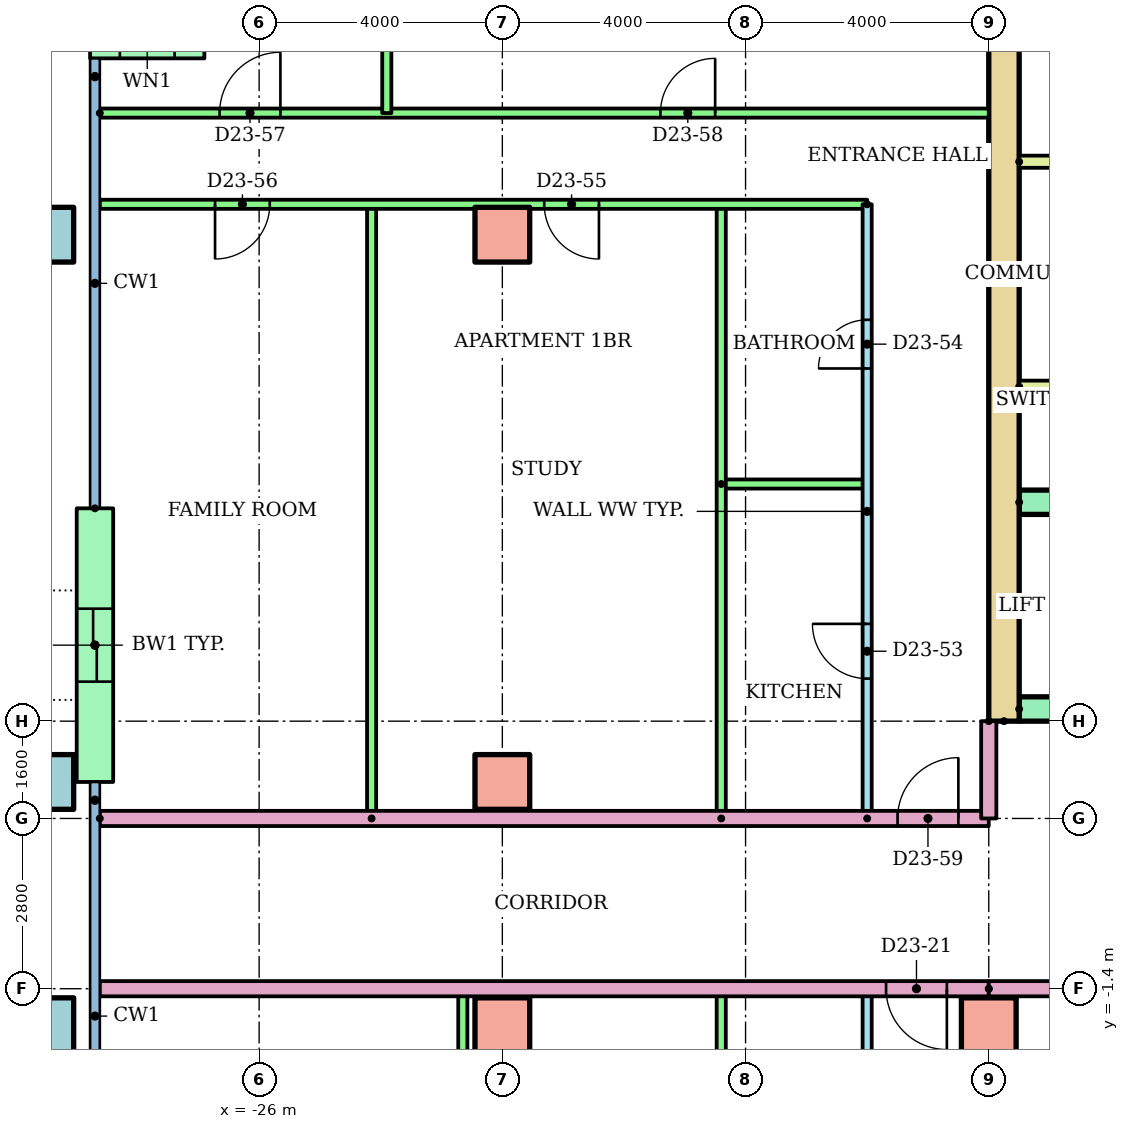
"""IFC4 building model, lengths in metres.
Left out: names, types, materials, properties, quantities, classifications, styles, units other than length and angle.
Written with IfcOpenShell. Run it as: python <this file> out.ifc"""

import sys

from ifc_helpers import new_model, si_unit, direction, frame, frame_2d, origin, origin_2d, place, context, subcontext, project, spatial, rectangle, hollow_rectangle, extrude, element, fill, save


model = new_model("IFC4")
c1 = context("Model", 3, precision=1e-05, world=origin(), true_north=direction((0.0, 1.0)))
c2 = subcontext(c1, "Body", "Model", "MODEL_VIEW")
j1 = project(units=[si_unit("LENGTHUNIT", "METRE"), si_unit("PLANEANGLEUNIT", "RADIAN")], contexts=[c1])
p1 = place(None, origin())
s1 = spatial("IfcSite", under=j1, at=p1, CompositionType="ELEMENT")
p2 = place(p1, origin())
s2 = spatial("IfcBuilding", under=s1, at=p2, CompositionType="ELEMENT")
p3 = place(p2, frame((0.0, 0.0, 90.3)))
s3 = spatial("IfcBuildingStorey", under=s2, at=p3, CompositionType="ELEMENT", Elevation=90.3)
p4 = place(p3, frame((-29.5, -2.0, 0.0)))
e1 = element("IfcColumn", 1, at=p4, inside=s3, PredefinedType="COLUMN", context=c2, shape_type="SweptSolid", body=[
    extrude(hollow_rectangle(XDim=0.9, YDim=0.9, WallThickness=0.045, at=origin_2d()), origin(), (0.0, 0.0, 1.0), 3.2),
])
for number, where in (
    (2, (-22.0, -2.0, 0.0)),
    (3, (-14.0, -2.0, 0.0)),
):
    element("IfcColumn", number, at=place(p3, frame(where)), inside=s3, PredefinedType="COLUMN", context=c2, shape_type="SweptSolid", body=[
        extrude(rectangle(XDim=0.9, YDim=0.9, at=origin_2d()), origin(), (0.0, 0.0, 1.0), 3.2),
    ])
p5 = place(p3, frame((-29.5, 2.0, 0.0)))
e4 = element("IfcColumn", 4, at=p5, inside=s3, PredefinedType="COLUMN", context=c2, shape_type="SweptSolid", body=[
    extrude(hollow_rectangle(XDim=0.9, YDim=0.9, WallThickness=0.045, at=origin_2d()), origin(), (0.0, 0.0, 1.0), 3.2),
])
p6 = place(p3, frame((-22.0, 2.0, 0.0)))
e5 = element("IfcColumn", 5, at=p6, inside=s3, PredefinedType="COLUMN", context=c2, shape_type="SweptSolid", body=[
    extrude(rectangle(XDim=0.9, YDim=0.9, at=origin_2d()), origin(), (0.0, 0.0, 1.0), 3.2),
])
p7 = place(p3, frame((-29.5, 11.0, 0.0)))
e6 = element("IfcColumn", 6, at=p7, inside=s3, PredefinedType="COLUMN", context=c2, shape_type="SweptSolid", body=[
    extrude(hollow_rectangle(XDim=0.9, YDim=0.9, WallThickness=0.045, at=origin_2d()), origin(), (0.0, 0.0, 1.0), 3.2),
])
p8 = place(p3, frame((-22.0, 11.0, 0.0)))
e7 = element("IfcColumn", 7, at=p8, inside=s3, PredefinedType="COLUMN", context=c2, shape_type="SweptSolid", body=[
    extrude(rectangle(XDim=0.9, YDim=0.9, at=origin_2d()), origin(), (0.0, 0.0, 1.0), 3.2),
])
p9 = place(p3, frame((-26.9, 14.2, 0.0), z_axis=(0.0, 0.0, 1.0), x_axis=(-1.0, 0.0, 0.0)))
e8 = element("IfcWall", 8, at=p9, inside=s3, PredefinedType="STANDARD", context=c2, shape_type="SweptSolid", body=[
    extrude(rectangle(XDim=1.88, YDim=0.6, at=frame_2d((0.94, 0.0))), origin(), (0.0, 0.0, 1.0), 2.92),
])
p10 = place(p9, frame((0.49, 0.0, 0.9)))
e9 = element("IfcOpeningElement", 9, at=p10, cuts=e8, PredefinedType="OPENING", context=c2, shape_type="SweptSolid", body=[
    extrude(rectangle(XDim=0.9, YDim=1.5, at=frame_2d((0.45, 0.75))), frame((0.0, 0.31, 0.0), z_axis=(0.0, -1.0, 0.0), x_axis=(1.0, 0.0, 0.0)), (0.0, 0.0, 1.0), 0.62),
])
p11 = place(p3, frame((-28.7, 6.5, 0.0), z_axis=(0.0, 0.0, 1.0), x_axis=(0.0, -1.0, 0.0)))
e10 = element("IfcWall", 10, at=p11, inside=s3, PredefinedType="STANDARD", context=c2, shape_type="SweptSolid", body=[
    extrude(rectangle(XDim=4.5, YDim=0.6, at=frame_2d((2.25, 0.0))), origin(), (0.0, 0.0, 1.0), 2.92),
])
p12 = place(p11, frame((1.65, 0.0, 0.0)))
e11 = element("IfcOpeningElement", 11, at=p12, cuts=e10, PredefinedType="OPENING", context=c2, shape_type="SweptSolid", body=[
    extrude(rectangle(XDim=1.2, YDim=2.1, at=frame_2d((0.6, 1.05))), frame((0.0, 0.31, 0.0), z_axis=(0.0, -1.0, 0.0), x_axis=(1.0, 0.0, 0.0)), (0.0, 0.0, 1.0), 0.62),
])
p13 = place(p3, frame((-13.75, 3.0, 0.0), z_axis=(0.0, 0.0, 1.0), x_axis=(0.0, 1.0, 0.0)))
e12 = element("IfcWall", 12, at=p13, inside=s3, PredefinedType="SHEAR", context=c2, shape_type="SweptSolid", body=[
    extrude(rectangle(XDim=17.0, YDim=0.5, at=frame_2d((8.5, 0.0))), origin(), (0.0, 0.0, 1.0), 2.92),
])
p14 = place(p3, frame((-13.5, 3.2, 0.0)))
e13 = element("IfcWall", 13, at=p14, inside=s3, PredefinedType="SHEAR", context=c2, shape_type="SweptSolid", body=[
    extrude(rectangle(XDim=27.0, YDim=0.4, at=frame_2d((13.5, 0.0))), origin(), (0.0, 0.0, 1.0), 2.92),
])
p15 = place(p14, frame((6.861, 0.0, 0.0)))
e14 = element("IfcOpeningElement", 14, at=p15, cuts=e13, PredefinedType="OPENING", context=c2, shape_type="SweptSolid", body=[
    extrude(rectangle(XDim=1.1, YDim=2.1, at=frame_2d((0.55, 1.05))), frame((0.0, 0.21, 0.0), z_axis=(0.0, -1.0, 0.0), x_axis=(1.0, 0.0, 0.0)), (0.0, 0.0, 1.0), 0.42),
])
p16 = place(p14, frame((9.906, 0.0, 0.0)))
e15 = element("IfcOpeningElement", 15, at=p16, cuts=e13, PredefinedType="OPENING", context=c2, shape_type="SweptSolid", body=[
    extrude(rectangle(XDim=1.1, YDim=2.1, at=frame_2d((0.55, 1.05))), frame((0.0, 0.21, 0.0), z_axis=(0.0, -1.0, 0.0), x_axis=(1.0, 0.0, 0.0)), (0.0, 0.0, 1.0), 0.42),
])
p17 = place(p14, frame((15.994, 0.0, 0.0)))
e16 = element("IfcOpeningElement", 16, at=p17, cuts=e13, PredefinedType="OPENING", context=c2, shape_type="SweptSolid", body=[
    extrude(rectangle(XDim=1.1, YDim=2.1, at=frame_2d((0.55, 1.05))), frame((0.0, 0.21, 0.0), z_axis=(0.0, -1.0, 0.0), x_axis=(1.0, 0.0, 0.0)), (0.0, 0.0, 1.0), 0.42),
])
p18 = place(p14, frame((19.039, 0.0, 0.0)))
e17 = element("IfcOpeningElement", 17, at=p18, cuts=e13, PredefinedType="OPENING", context=c2, shape_type="SweptSolid", body=[
    extrude(rectangle(XDim=1.1, YDim=2.1, at=frame_2d((0.55, 1.05))), frame((0.0, 0.21, 0.0), z_axis=(0.0, -1.0, 0.0), x_axis=(1.0, 0.0, 0.0)), (0.0, 0.0, 1.0), 0.42),
])
p19 = place(p14, frame((12.6, 0.0, 0.0)))
e18 = element("IfcOpeningElement", 18, at=p19, cuts=e13, PredefinedType="OPENING", context=c2, shape_type="SweptSolid", body=[
    extrude(rectangle(XDim=1.8, YDim=2.1, at=frame_2d((0.9, 1.05))), frame((0.0, 0.21, 0.0), z_axis=(0.0, -1.0, 0.0), x_axis=(1.0, 0.0, 0.0)), (0.0, 0.0, 1.0), 0.42),
])
p20 = place(p3, frame((-13.5, 6.6, 0.0)))
e19 = element("IfcWall", 19, at=p20, inside=s3, PredefinedType="SHEAR", context=c2, shape_type="SweptSolid", body=[
    extrude(rectangle(XDim=11.978, YDim=0.4, at=frame_2d((5.989, 0.0))), origin(), (0.0, 0.0, 1.0), 2.92),
])
for number, where in (
    (20, (-13.5, 8.5, 0.0)),
    (21, (-13.5, 12.2, 0.0)),
):
    element("IfcWall", number, at=place(p3, frame(where)), inside=s3, PredefinedType="PARTITIONING", context=c2, shape_type="SweptSolid", body=[
        extrude(rectangle(XDim=3.9, YDim=0.2, at=frame_2d((1.95, 0.0))), origin(), (0.0, 0.0, 1.0), 2.92),
    ])
p21 = place(p3, frame((-16.0, -9.1, 0.0), z_axis=(0.0, 0.0, 1.0), x_axis=(0.0, 1.0, 0.0)))
e22 = element("IfcWall", 22, at=p21, inside=s3, PredefinedType="PARTITIONING", context=c2, shape_type="SweptSolid", body=[
    extrude(rectangle(XDim=7.7, YDim=0.15, at=frame_2d((3.85, 0.0))), origin(), (0.0, 0.0, 1.0), 2.4),
])
p22 = place(p21, frame((5.125, 0.0, 0.0)))
e23 = element("IfcOpeningElement", 23, at=p22, cuts=e22, PredefinedType="OPENING", context=c2, shape_type="SweptSolid", body=[
    extrude(rectangle(XDim=0.9, YDim=2.1, at=frame_2d((0.45, 1.05))), frame((0.0, 0.085, 0.0), z_axis=(0.0, -1.0, 0.0), x_axis=(1.0, 0.0, 0.0)), (0.0, 0.0, 1.0), 0.17),
])
p23 = place(p21, frame((1.325, 0.0, 0.0)))
e24 = element("IfcOpeningElement", 24, at=p23, cuts=e22, PredefinedType="OPENING", context=c2, shape_type="SweptSolid", body=[
    extrude(rectangle(XDim=0.8, YDim=2.1, at=frame_2d((0.4, 1.05))), frame((0.0, 0.085, 0.0), z_axis=(0.0, -1.0, 0.0), x_axis=(1.0, 0.0, 0.0)), (0.0, 0.0, 1.0), 0.17),
])
for number, where, z_axis, x_axis in (
    (25, (-18.4, -9.1, 0.0), (0.0, 0.0, 1.0), (0.0, 1.0, 0.0)),
    (26, (-22.65, -9.1, 0.0), (0.0, 0.0, 1.0), (0.0, 1.0, 0.0)),
):
    element("IfcWall", number, at=place(p3, frame(where, z_axis=z_axis, x_axis=x_axis)), inside=s3, PredefinedType="PARTITIONING", context=c2, shape_type="SweptSolid", body=[
        extrude(rectangle(XDim=7.7, YDim=0.15, at=frame_2d((3.85, 0.0))), origin(), (0.0, 0.0, 1.0), 2.4),
    ])
p24 = place(p3, frame((-14.0, -1.4, 0.0), z_axis=(0.0, 0.0, 1.0), x_axis=(0.0, -1.0, 0.0)))
e27 = element("IfcWall", 27, at=p24, inside=s3, PredefinedType="PARTITIONING", context=c2, shape_type="SweptSolid", body=[
    extrude(rectangle(XDim=14.81, YDim=0.25, at=frame_2d((7.405, 0.0))), origin(), (0.0, 0.0, 1.0), 2.4),
])
p25 = place(p3, frame((-14.0, -1.4, 0.0), z_axis=(0.0, 0.0, 1.0), x_axis=(-1.0, 0.0, 0.0)))
e28 = element("IfcWall", 28, at=p25, inside=s3, PredefinedType="PARTITIONING", context=c2, shape_type="SweptSolid", body=[
    extrude(rectangle(XDim=14.62, YDim=0.25, at=frame_2d((7.31, 0.0))), origin(), (0.0, 0.0, 1.0), 2.4),
])
p26 = place(p25, frame((0.689, 0.0, 0.0)))
e29 = element("IfcOpeningElement", 29, at=p26, cuts=e28, PredefinedType="OPENING", context=c2, shape_type="SweptSolid", body=[
    extrude(rectangle(XDim=1.0, YDim=2.1, at=frame_2d((0.5, 1.05))), frame((0.0, 0.135, 0.0), z_axis=(0.0, -1.0, 0.0), x_axis=(1.0, 0.0, 0.0)), (0.0, 0.0, 1.0), 0.27),
])
p27 = place(p3, frame((-16.0, 1.4, 0.0), z_axis=(0.0, 0.0, 1.0), x_axis=(0.0, 1.0, 0.0)))
e30 = element("IfcWall", 30, at=p27, inside=s3, PredefinedType="PARTITIONING", context=c2, shape_type="SweptSolid", body=[
    extrude(rectangle(XDim=10.1, YDim=0.15, at=frame_2d((5.05, 0.0))), origin(), (0.0, 0.0, 1.0), 2.4),
])
p28 = place(p27, frame((2.3, 0.0, 0.0)))
e31 = element("IfcOpeningElement", 31, at=p28, cuts=e30, PredefinedType="OPENING", context=c2, shape_type="SweptSolid", body=[
    extrude(rectangle(XDim=0.9, YDim=2.1, at=frame_2d((0.45, 1.05))), frame((0.0, 0.085, 0.0), z_axis=(0.0, -1.0, 0.0), x_axis=(1.0, 0.0, 0.0)), (0.0, 0.0, 1.0), 0.17),
])
p29 = place(p27, frame((7.4, 0.0, 0.0)))
e32 = element("IfcOpeningElement", 32, at=p29, cuts=e30, PredefinedType="OPENING", context=c2, shape_type="SweptSolid", body=[
    extrude(rectangle(XDim=0.8, YDim=2.1, at=frame_2d((0.4, 1.05))), frame((0.0, 0.085, 0.0), z_axis=(0.0, -1.0, 0.0), x_axis=(1.0, 0.0, 0.0)), (0.0, 0.0, 1.0), 0.17),
])
p30 = place(p3, frame((-18.4, 6.9, 0.0)))
e33 = element("IfcWall", 33, at=p30, inside=s3, PredefinedType="PARTITIONING", context=c2, shape_type="SweptSolid", body=[
    extrude(rectangle(XDim=2.4, YDim=0.15, at=frame_2d((1.2, 0.0))), origin(), (0.0, 0.0, 1.0), 2.4),
])
for number, where, z_axis, x_axis in (
    (34, (-18.4, 1.4, 0.0), (0.0, 0.0, 1.0), (0.0, 1.0, 0.0)),
    (35, (-24.15, 1.4, 0.0), (0.0, 0.0, 1.0), (0.0, 1.0, 0.0)),
):
    element("IfcWall", number, at=place(p3, frame(where, z_axis=z_axis, x_axis=x_axis)), inside=s3, PredefinedType="PARTITIONING", context=c2, shape_type="SweptSolid", body=[
        extrude(rectangle(XDim=10.1, YDim=0.15, at=frame_2d((5.05, 0.0))), origin(), (0.0, 0.0, 1.0), 2.4),
    ])
p31 = place(p3, frame((-16.0, 11.5, 0.0), z_axis=(0.0, 0.0, 1.0), x_axis=(-1.0, 0.0, 0.0)))
e36 = element("IfcWall", 36, at=p31, inside=s3, PredefinedType="PARTITIONING", context=c2, shape_type="SweptSolid", body=[
    extrude(rectangle(XDim=12.62, YDim=0.15, at=frame_2d((6.31, 0.0))), origin(), (0.0, 0.0, 1.0), 2.4),
])
p32 = place(p31, frame((4.411, 0.0, 0.0)))
e37 = element("IfcOpeningElement", 37, at=p32, cuts=e36, PredefinedType="OPENING", context=c2, shape_type="SweptSolid", body=[
    extrude(rectangle(XDim=0.9, YDim=2.1, at=frame_2d((0.45, 1.05))), frame((0.0, 0.085, 0.0), z_axis=(0.0, -1.0, 0.0), x_axis=(1.0, 0.0, 0.0)), (0.0, 0.0, 1.0), 0.17),
])
p33 = place(p31, frame((9.825, 0.0, 0.0)))
e38 = element("IfcOpeningElement", 38, at=p33, cuts=e36, PredefinedType="OPENING", context=c2, shape_type="SweptSolid", body=[
    extrude(rectangle(XDim=0.9, YDim=2.1, at=frame_2d((0.45, 1.05))), frame((0.0, 0.085, 0.0), z_axis=(0.0, -1.0, 0.0), x_axis=(1.0, 0.0, 0.0)), (0.0, 0.0, 1.0), 0.17),
])
p34 = place(p3, frame((-28.62, 13.0, 0.0)))
e39 = element("IfcWall", 39, at=p34, inside=s3, PredefinedType="PARTITIONING", context=c2, shape_type="SweptSolid", body=[
    extrude(rectangle(XDim=14.62, YDim=0.15, at=frame_2d((7.31, 0.0))), origin(), (0.0, 0.0, 1.0), 2.4),
])
p35 = place(p34, frame((1.97, 0.0, 0.0)))
e40 = element("IfcOpeningElement", 40, at=p35, cuts=e39, PredefinedType="OPENING", context=c2, shape_type="SweptSolid", body=[
    extrude(rectangle(XDim=1.0, YDim=2.1, at=frame_2d((0.5, 1.05))), frame((0.0, 0.085, 0.0), z_axis=(0.0, -1.0, 0.0), x_axis=(1.0, 0.0, 0.0)), (0.0, 0.0, 1.0), 0.17),
])
p36 = place(p34, frame((9.22, 0.0, 0.0)))
e41 = element("IfcOpeningElement", 41, at=p36, cuts=e39, PredefinedType="OPENING", context=c2, shape_type="SweptSolid", body=[
    extrude(rectangle(XDim=0.9, YDim=2.1, at=frame_2d((0.45, 1.05))), frame((0.0, 0.085, 0.0), z_axis=(0.0, -1.0, 0.0), x_axis=(1.0, 0.0, 0.0)), (0.0, 0.0, 1.0), 0.17),
])
p37 = place(p3, frame((-23.9, 16.82, 0.0), z_axis=(0.0, 0.0, 1.0), x_axis=(0.0, -1.0, 0.0)))
e42 = element("IfcWall", 42, at=p37, inside=s3, PredefinedType="PARTITIONING", context=c2, shape_type="SweptSolid", body=[
    extrude(rectangle(XDim=3.82, YDim=0.15, at=frame_2d((1.91, 0.0))), origin(), (0.0, 0.0, 1.0), 2.4),
])
p38 = place(p3, frame((-28.62, 1.4, 0.0)))
e43 = element("IfcWall", 43, at=p38, inside=s3, PredefinedType="PARTITIONING", context=c2, shape_type="SweptSolid", body=[
    extrude(rectangle(XDim=14.62, YDim=0.25, at=frame_2d((7.31, 0.0))), origin(), (0.0, 0.0, 1.0), 2.4),
])
p39 = place(p38, frame((13.12, 0.0, 0.0)))
e44 = element("IfcOpeningElement", 44, at=p39, cuts=e43, PredefinedType="OPENING", context=c2, shape_type="SweptSolid", body=[
    extrude(rectangle(XDim=1.0, YDim=2.1, at=frame_2d((0.5, 1.05))), frame((0.0, 0.135, 0.0), z_axis=(0.0, -1.0, 0.0), x_axis=(1.0, 0.0, 0.0)), (0.0, 0.0, 1.0), 0.27),
])
p40 = place(p3, frame((14.0, -1.4, 0.0), z_axis=(0.0, 0.0, 1.0), x_axis=(-1.0, 0.0, 0.0)))
e45 = element("IfcWall", 45, at=p40, inside=s3, PredefinedType="PARTITIONING", context=c2, shape_type="SweptSolid", body=[
    extrude(rectangle(XDim=28.0, YDim=0.25, at=frame_2d((14.0, 0.0))), origin(), (0.0, 0.0, 1.0), 2.4),
])
p41 = place(p40, frame((12.689, 0.0, 0.0)))
e46 = element("IfcOpeningElement", 46, at=p41, cuts=e45, PredefinedType="OPENING", context=c2, shape_type="SweptSolid", body=[
    extrude(rectangle(XDim=1.0, YDim=2.1, at=frame_2d((0.5, 1.05))), frame((0.0, 0.135, 0.0), z_axis=(0.0, -1.0, 0.0), x_axis=(1.0, 0.0, 0.0)), (0.0, 0.0, 1.0), 0.27),
])
p42 = place(p40, frame((10.311, 0.0, 0.0)))
e47 = element("IfcOpeningElement", 47, at=p42, cuts=e45, PredefinedType="OPENING", context=c2, shape_type="SweptSolid", body=[
    extrude(rectangle(XDim=1.0, YDim=2.1, at=frame_2d((0.5, 1.05))), frame((0.0, 0.135, 0.0), z_axis=(0.0, -1.0, 0.0), x_axis=(1.0, 0.0, 0.0)), (0.0, 0.0, 1.0), 0.27),
])
p43 = place(p3, frame((-14.0, 3.0, 0.0), z_axis=(0.0, 0.0, 1.0), x_axis=(0.0, -1.0, 0.0)))
e48 = element("IfcWall", 48, at=p43, inside=s3, PredefinedType="PARTITIONING", context=c2, shape_type="SweptSolid", body=[
    extrude(rectangle(XDim=1.6, YDim=0.25, at=frame_2d((0.8, 0.0))), origin(), (0.0, 0.0, 1.0), 2.4),
])
p44 = place(p26, origin())
e49 = element("IfcDoor", 49, at=p44, inside=s3, OperationType="SINGLE_SWING_LEFT", PredefinedType="DOOR", context=c2, shape_type="SweptSolid", body=[
    extrude(rectangle(XDim=1.0, YDim=2.1, at=frame_2d((0.5, 1.05))), frame((0.0, 0.025, 0.0), z_axis=(0.0, -1.0, 0.0), x_axis=(1.0, 0.0, 0.0)), (0.0, 0.0, 1.0), 0.05),
])
fill(e29, e49)
p45 = place(p28, origin())
e50 = element("IfcDoor", 50, at=p45, inside=s3, OperationType="SINGLE_SWING_RIGHT", PredefinedType="DOOR", context=c2, shape_type="SweptSolid", body=[
    extrude(rectangle(XDim=0.9, YDim=2.1, at=frame_2d((0.45, 1.05))), frame((0.0, 0.025, 0.0), z_axis=(0.0, -1.0, 0.0), x_axis=(1.0, 0.0, 0.0)), (0.0, 0.0, 1.0), 0.05),
])
fill(e31, e50)
p46 = place(p29, origin())
e51 = element("IfcDoor", 51, at=p46, inside=s3, OperationType="SINGLE_SWING_LEFT", PredefinedType="DOOR", context=c2, shape_type="SweptSolid", body=[
    extrude(rectangle(XDim=0.8, YDim=2.1, at=frame_2d((0.4, 1.05))), frame((0.0, 0.025, 0.0), z_axis=(0.0, -1.0, 0.0), x_axis=(1.0, 0.0, 0.0)), (0.0, 0.0, 1.0), 0.05),
])
fill(e32, e51)
p47 = place(p32, origin())
e52 = element("IfcDoor", 52, at=p47, inside=s3, OperationType="SINGLE_SWING_LEFT", PredefinedType="DOOR", context=c2, shape_type="SweptSolid", body=[
    extrude(rectangle(XDim=0.9, YDim=2.1, at=frame_2d((0.45, 1.05))), frame((0.0, 0.025, 0.0), z_axis=(0.0, -1.0, 0.0), x_axis=(1.0, 0.0, 0.0)), (0.0, 0.0, 1.0), 0.05),
])
fill(e37, e52)
p48 = place(p33, origin())
e53 = element("IfcDoor", 53, at=p48, inside=s3, OperationType="SINGLE_SWING_RIGHT", PredefinedType="DOOR", context=c2, shape_type="SweptSolid", body=[
    extrude(rectangle(XDim=0.9, YDim=2.1, at=frame_2d((0.45, 1.05))), frame((0.0, 0.025, 0.0), z_axis=(0.0, -1.0, 0.0), x_axis=(1.0, 0.0, 0.0)), (0.0, 0.0, 1.0), 0.05),
])
fill(e38, e53)
p49 = place(p35, origin())
e54 = element("IfcDoor", 54, at=p49, inside=s3, OperationType="SINGLE_SWING_RIGHT", PredefinedType="DOOR", context=c2, shape_type="SweptSolid", body=[
    extrude(rectangle(XDim=1.0, YDim=2.1, at=frame_2d((0.5, 1.05))), frame((0.0, 0.025, 0.0), z_axis=(0.0, -1.0, 0.0), x_axis=(1.0, 0.0, 0.0)), (0.0, 0.0, 1.0), 0.05),
])
fill(e40, e54)
p50 = place(p36, origin())
e55 = element("IfcDoor", 55, at=p50, inside=s3, OperationType="SINGLE_SWING_RIGHT", PredefinedType="DOOR", context=c2, shape_type="SweptSolid", body=[
    extrude(rectangle(XDim=0.9, YDim=2.1, at=frame_2d((0.45, 1.05))), frame((0.0, 0.025, 0.0), z_axis=(0.0, -1.0, 0.0), x_axis=(1.0, 0.0, 0.0)), (0.0, 0.0, 1.0), 0.05),
])
fill(e41, e55)
p51 = place(p39, origin())
e56 = element("IfcDoor", 56, at=p51, inside=s3, OperationType="SINGLE_SWING_RIGHT", PredefinedType="DOOR", context=c2, shape_type="SweptSolid", body=[
    extrude(rectangle(XDim=1.0, YDim=2.1, at=frame_2d((0.5, 1.05))), frame((0.0, 0.025, 0.0), z_axis=(0.0, -1.0, 0.0), x_axis=(1.0, 0.0, 0.0)), (0.0, 0.0, 1.0), 0.05),
])
fill(e44, e56)
p52 = place(p12, origin())
e57 = element("IfcDoor", 57, at=p52, inside=s3, OperationType="SLIDING_TO_LEFT", PredefinedType="DOOR", context=c2, shape_type="SweptSolid", body=[
    extrude(rectangle(XDim=1.2, YDim=2.1, at=frame_2d((0.6, 1.05))), frame((0.0, 0.025, 0.0), z_axis=(0.0, -1.0, 0.0), x_axis=(1.0, 0.0, 0.0)), (0.0, 0.0, 1.0), 0.05),
])
fill(e11, e57)
save(model, sys.argv[1])
